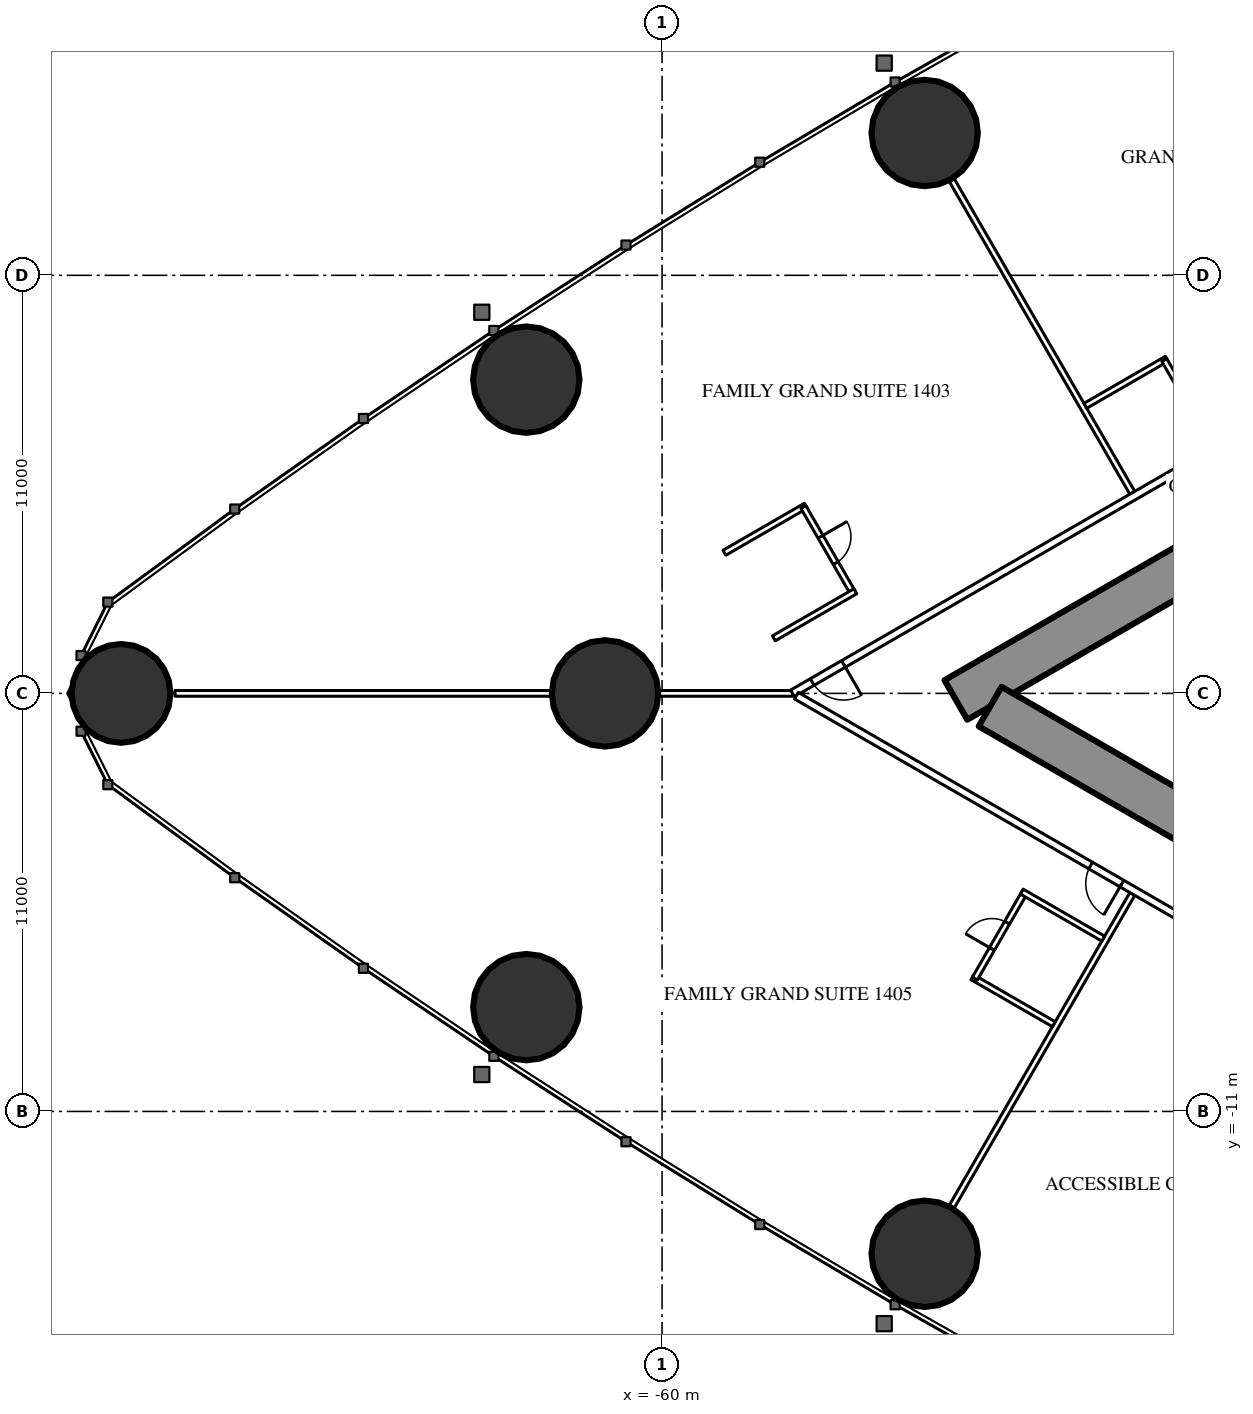
"""IFC4 building model, lengths in metres.
Left out: names, types, materials, properties, quantities, classifications, styles, units other than length and angle.
Written with IfcOpenShell. Run it as: python <this file> out.ifc"""

import sys

from ifc_helpers import new_model, si_unit, direction, frame, frame_2d, origin, origin_2d, place, context, subcontext, project, spatial, rectangle, hollow_circle, extrude, element, fill, save


model = new_model("IFC4")
c1 = context("Model", 3, precision=1e-05, world=origin(), true_north=direction((0.0, 1.0)))
c2 = subcontext(c1, "Body", "Model", "MODEL_VIEW")
j1 = project(units=[si_unit("LENGTHUNIT", "METRE"), si_unit("PLANEANGLEUNIT", "RADIAN")], contexts=[c1])
p1 = place(None, origin())
s1 = spatial("IfcSite", under=j1, at=p1, CompositionType="ELEMENT")
p2 = place(p1, origin())
s2 = spatial("IfcBuilding", under=s1, at=p2, CompositionType="ELEMENT")
p3 = place(p2, frame((0.0, 0.0, 56.5)))
s3 = spatial("IfcBuildingStorey", under=s2, at=p3, CompositionType="ELEMENT", Elevation=56.5)
p4 = place(p3, frame((-74.235, 0.0, 0.0), z_axis=(0.0, 0.0, 1.0), x_axis=(1.0, 0.0, 0.0)))
e1 = element("IfcColumn", 1, at=p4, inside=s3, PredefinedType="COLUMN", context=c2, shape_type="SweptSolid", body=[
    extrude(hollow_circle(Radius=1.3, WallThickness=0.1, at=origin_2d()), origin(), (0.0, 0.0, 1.0), 3.5),
])
for number, where, z_axis, x_axis in (
    (2, (-63.572, -8.255, 0.0), (0.0, 0.0, 1.0), (1.0, 0.0, 0.0)),
    (3, (-53.09, -14.745, 0.0), (0.0, 0.0, 1.0), (1.0, 0.0, 0.0)),
    (4, (-53.09, 14.745, 0.0), (0.0, 0.0, 1.0), (1.0, 0.0, 0.0)),
    (5, (-63.572, 8.255, 0.0), (0.0, 0.0, 1.0), (1.0, 0.0, 0.0)),
):
    element("IfcColumn", number, at=place(p3, frame(where, z_axis=z_axis, x_axis=x_axis)), inside=s3, PredefinedType="COLUMN", context=c2, shape_type="SweptSolid", body=[
        extrude(hollow_circle(Radius=1.4, WallThickness=0.12, at=origin_2d()), origin(), (0.0, 0.0, 1.0), 3.5),
    ])
p5 = place(p3, frame((-61.5, 0.0, 0.0), z_axis=(0.0, 0.0, 1.0), x_axis=(1.0, 0.0, 0.0)))
e6 = element("IfcColumn", 6, at=p5, inside=s3, PredefinedType="COLUMN", context=c2, shape_type="SweptSolid", body=[
    extrude(hollow_circle(Radius=1.4, WallThickness=0.1, at=origin_2d()), origin(), (0.0, 0.0, 1.0), 3.5),
])
p6 = place(p3, frame((-27.2, 14.3, 0.0), z_axis=(0.0, 0.0, 1.0), x_axis=(-0.866026593062, -0.499997940104, 0.0)))
e7 = element("IfcWall", 7, at=p6, inside=s3, PredefinedType="SHEAR", context=c2, shape_type="SweptSolid", body=[
    extrude(rectangle(XDim=28.946, YDim=1.2, at=frame_2d((14.473, 0.0))), origin(), (0.0, 0.0, 1.0), 3.5),
])
p7 = place(p6, frame((4.6, 0.0, 0.0)))
e8 = element("IfcOpeningElement", 8, at=p7, cuts=e7, PredefinedType="OPENING", context=c2, shape_type="SweptSolid", body=[
    extrude(rectangle(XDim=1.0, YDim=2.2, at=frame_2d((0.5, 1.1))), frame((0.0, 0.61, 0.0), z_axis=(0.0, -1.0, 0.0), x_axis=(1.0, 0.0, 0.0)), (0.0, 0.0, 1.0), 1.22),
])
p8 = place(p6, frame((13.395, 0.0, 0.0)))
e9 = element("IfcOpeningElement", 9, at=p8, cuts=e7, PredefinedType="OPENING", context=c2, shape_type="SweptSolid", body=[
    extrude(rectangle(XDim=1.8, YDim=2.2, at=frame_2d((0.9, 1.1))), frame((0.0, 0.61, 0.0), z_axis=(0.0, -1.0, 0.0), x_axis=(1.0, 0.0, 0.0)), (0.0, 0.0, 1.0), 1.22),
])
p9 = place(p3, frame((-27.2, -14.3, 0.0), z_axis=(0.0, 0.0, 1.0), x_axis=(-0.866024021859, 0.500002393557, 0.0)))
e10 = element("IfcWall", 10, at=p9, inside=s3, PredefinedType="SHEAR", context=c2, shape_type="SweptSolid", body=[
    extrude(rectangle(XDim=27.907, YDim=1.2, at=frame_2d((13.954, 0.0))), origin(), (0.0, 0.0, 1.0), 3.5),
])
p10 = place(p9, frame((4.6, 0.0, 0.0)))
e11 = element("IfcOpeningElement", 11, at=p10, cuts=e10, PredefinedType="OPENING", context=c2, shape_type="SweptSolid", body=[
    extrude(rectangle(XDim=1.0, YDim=2.2, at=frame_2d((0.5, 1.1))), frame((0.0, 0.61, 0.0), z_axis=(0.0, -1.0, 0.0), x_axis=(1.0, 0.0, 0.0)), (0.0, 0.0, 1.0), 1.22),
])
p11 = place(p9, frame((13.395, 0.0, 0.0)))
e12 = element("IfcOpeningElement", 12, at=p11, cuts=e10, PredefinedType="OPENING", context=c2, shape_type="SweptSolid", body=[
    extrude(rectangle(XDim=1.8, YDim=2.2, at=frame_2d((0.9, 1.1))), frame((0.0, 0.61, 0.0), z_axis=(0.0, -1.0, 0.0), x_axis=(1.0, 0.0, 0.0)), (0.0, 0.0, 1.0), 1.22),
])
for number, where, z_axis, x_axis in (
    (13, (-47.627, 5.278, 0.0), (0.0, 0.0, 1.0), (-0.5, 0.866, 0.0)),
    (14, (-47.627, -5.278, 0.0), (0.0, 0.0, 1.0), (-0.5, -0.866, 0.0)),
):
    element("IfcWall", number, at=place(p3, frame(where, z_axis=z_axis, x_axis=x_axis)), inside=s3, PredefinedType="PARTITIONING", context=c2, shape_type="SweptSolid", body=[
        extrude(rectangle(XDim=9.51, YDim=0.15, at=frame_2d((4.755, 0.0))), origin(), (0.0, 0.0, 1.0), 2.25),
    ])
p12 = place(p3, frame((-56.568, 0.0, 0.0), z_axis=(0.0, 0.0, 1.0), x_axis=(-1.0, 0.0, 0.0)))
e15 = element("IfcWall", 15, at=p12, inside=s3, PredefinedType="PARTITIONING", context=c2, shape_type="SweptSolid", body=[
    extrude(rectangle(XDim=16.247, YDim=0.15, at=frame_2d((8.124, 0.0))), origin(), (0.0, 0.0, 1.0), 2.25),
])
p13 = place(p3, frame((-37.7, 10.894, 0.0), z_axis=(0.0, 0.0, 1.0), x_axis=(-0.866027905338, -0.499995667157, 0.0)))
e16 = element("IfcWall", 16, at=p13, inside=s3, PredefinedType="PARTITIONING", context=c2, shape_type="SweptSolid", body=[
    extrude(rectangle(XDim=21.787, YDim=0.2, at=frame_2d((10.894, 0.0))), origin(), (0.0, 0.0, 1.0), 3.25),
])
p14 = place(p13, frame((20.237, 0.0, 0.0)))
e17 = element("IfcOpeningElement", 17, at=p14, cuts=e16, PredefinedType="OPENING", context=c2, shape_type="SweptSolid", body=[
    extrude(rectangle(XDim=0.95, YDim=2.2, at=frame_2d((0.475, 1.1))), frame((0.0, 0.11, 0.0), z_axis=(0.0, -1.0, 0.0), x_axis=(1.0, 0.0, 0.0)), (0.0, 0.0, 1.0), 0.22),
])
p15 = place(p13, frame((7.73, 0.0, 0.0)))
e18 = element("IfcOpeningElement", 18, at=p15, cuts=e16, PredefinedType="OPENING", context=c2, shape_type="SweptSolid", body=[
    extrude(rectangle(XDim=0.95, YDim=2.2, at=frame_2d((0.475, 1.1))), frame((0.0, 0.11, 0.0), z_axis=(0.0, -1.0, 0.0), x_axis=(1.0, 0.0, 0.0)), (0.0, 0.0, 1.0), 0.22),
])
p16 = place(p3, frame((-36.92, -11.344, 0.0), z_axis=(0.0, 0.0, 1.0), x_axis=(-0.866028313256, 0.499994960614, 0.0)))
e19 = element("IfcWall", 19, at=p16, inside=s3, PredefinedType="PARTITIONING", context=c2, shape_type="SweptSolid", body=[
    extrude(rectangle(XDim=22.568, YDim=0.2, at=frame_2d((11.284, 0.0))), origin(), (0.0, 0.0, 1.0), 3.25),
])
p17 = place(p16, frame((12.68, 0.0, 0.0)))
e20 = element("IfcOpeningElement", 20, at=p17, cuts=e19, PredefinedType="OPENING", context=c2, shape_type="SweptSolid", body=[
    extrude(rectangle(XDim=0.95, YDim=2.2, at=frame_2d((0.475, 1.1))), frame((0.0, 0.11, 0.0), z_axis=(0.0, -1.0, 0.0), x_axis=(1.0, 0.0, 0.0)), (0.0, 0.0, 1.0), 0.22),
])
p18 = place(p16, frame((3.35, 0.0, 0.0)))
e21 = element("IfcOpeningElement", 21, at=p18, cuts=e19, PredefinedType="OPENING", context=c2, shape_type="SweptSolid", body=[
    extrude(rectangle(XDim=1.0, YDim=2.2, at=frame_2d((0.5, 1.1))), frame((0.0, 0.11, 0.0), z_axis=(0.0, -1.0, 0.0), x_axis=(1.0, 0.0, 0.0)), (0.0, 0.0, 1.0), 0.22),
])
p19 = place(p3, frame((-56.215, 4.938, 0.0), z_axis=(0.0, 0.0, 1.0), x_axis=(-0.866006523861, -0.500032699561, 0.0)))
e22 = element("IfcWall", 22, at=p19, inside=s3, PredefinedType="PARTITIONING", context=c2, shape_type="SweptSolid", body=[
    extrude(rectangle(XDim=2.475, YDim=0.15, at=frame_2d((1.237, 0.0))), origin(), (0.0, 0.0, 1.0), 3.25),
])
p20 = place(p3, frame((-54.98, 2.649, 0.0), z_axis=(0.0, 0.0, 1.0), x_axis=(-0.500006934395, 0.866021400173, 0.0)))
e23 = element("IfcWall", 23, at=p20, inside=s3, PredefinedType="PARTITIONING", context=c2, shape_type="SweptSolid", body=[
    extrude(rectangle(XDim=2.6, YDim=0.15, at=frame_2d((1.3, 0.0))), origin(), (0.0, 0.0, 1.0), 3.25),
])
p21 = place(p20, frame((0.9, 0.0, 0.0)))
e24 = element("IfcOpeningElement", 24, at=p21, cuts=e23, PredefinedType="OPENING", context=c2, shape_type="SweptSolid", body=[
    extrude(rectangle(XDim=0.8, YDim=2.2, at=frame_2d((0.4, 1.1))), frame((0.0, 0.085, 0.0), z_axis=(0.0, -1.0, 0.0), x_axis=(1.0, 0.0, 0.0)), (0.0, 0.0, 1.0), 0.17),
])
p22 = place(p3, frame((-54.915, 2.687, 0.0), z_axis=(0.0, 0.0, 1.0), x_axis=(-0.866006523861, -0.500032699561, 0.0)))
e25 = element("IfcWall", 25, at=p22, inside=s3, PredefinedType="PARTITIONING", context=c2, shape_type="SweptSolid", body=[
    extrude(rectangle(XDim=2.475, YDim=0.15, at=frame_2d((1.237, 0.0))), origin(), (0.0, 0.0, 1.0), 3.25),
])
p23 = place(p3, frame((-49.692, -8.704, 0.0), z_axis=(0.0, 0.0, 1.0), x_axis=(-0.866073894602, 0.499916002032, 0.0)))
e26 = element("IfcWall", 26, at=p23, inside=s3, PredefinedType="PARTITIONING", context=c2, shape_type="SweptSolid", body=[
    extrude(rectangle(XDim=2.475, YDim=0.15, at=frame_2d((1.238, 0.0))), origin(), (0.0, 0.0, 1.0), 3.25),
])
p24 = place(p3, frame((-50.47, -5.253, 0.0), z_axis=(0.0, 0.0, 1.0), x_axis=(-0.500006934395, -0.866021400173, 0.0)))
e27 = element("IfcWall", 27, at=p24, inside=s3, PredefinedType="PARTITIONING", context=c2, shape_type="SweptSolid", body=[
    extrude(rectangle(XDim=2.6, YDim=0.15, at=frame_2d((1.3, 0.0))), origin(), (0.0, 0.0, 1.0), 3.25),
])
p25 = place(p24, frame((0.9, 0.0, 0.0)))
e28 = element("IfcOpeningElement", 28, at=p25, cuts=e27, PredefinedType="OPENING", context=c2, shape_type="SweptSolid", body=[
    extrude(rectangle(XDim=0.8, YDim=2.2, at=frame_2d((0.4, 1.1))), frame((0.0, 0.085, 0.0), z_axis=(0.0, -1.0, 0.0), x_axis=(1.0, 0.0, 0.0)), (0.0, 0.0, 1.0), 0.17),
])
for number, where, z_axis, x_axis in (
    (29, (-48.392, -6.453, 0.0), (0.0, 0.0, 1.0), (-0.866, 0.5, 0.0)),
    (30, (-46.719, 8.804, 0.0), (0.0, 0.0, 1.0), (-0.866, -0.5, 0.0)),
):
    element("IfcWall", number, at=place(p3, frame(where, z_axis=z_axis, x_axis=x_axis)), inside=s3, PredefinedType="PARTITIONING", context=c2, shape_type="SweptSolid", body=[
        extrude(rectangle(XDim=2.475, YDim=0.15, at=frame_2d((1.237, 0.0))), origin(), (0.0, 0.0, 1.0), 3.25),
    ])
p26 = place(p3, frame((-45.483, 6.515, 0.0), z_axis=(0.0, 0.0, 1.0), x_axis=(-0.500006934395, 0.866021400173, 0.0)))
e31 = element("IfcWall", 31, at=p26, inside=s3, PredefinedType="PARTITIONING", context=c2, shape_type="SweptSolid", body=[
    extrude(rectangle(XDim=2.6, YDim=0.15, at=frame_2d((1.3, 0.0))), origin(), (0.0, 0.0, 1.0), 3.25),
])
p27 = place(p26, frame((0.9, 0.0, 0.0)))
e32 = element("IfcOpeningElement", 32, at=p27, cuts=e31, PredefinedType="OPENING", context=c2, shape_type="SweptSolid", body=[
    extrude(rectangle(XDim=0.8, YDim=2.2, at=frame_2d((0.4, 1.1))), frame((0.0, 0.085, 0.0), z_axis=(0.0, -1.0, 0.0), x_axis=(1.0, 0.0, 0.0)), (0.0, 0.0, 1.0), 0.17),
])
p28 = place(p21, origin())
e33 = element("IfcDoor", 33, at=p28, inside=s3, OperationType="SINGLE_SWING_RIGHT", PredefinedType="DOOR", context=c2, shape_type="SweptSolid", body=[
    extrude(rectangle(XDim=0.8, YDim=2.2, at=frame_2d((0.4, 1.1))), frame((0.0, 0.025, 0.0), z_axis=(0.0, -1.0, 0.0), x_axis=(1.0, 0.0, 0.0)), (0.0, 0.0, 1.0), 0.05),
])
fill(e24, e33)
p29 = place(p14, origin())
e34 = element("IfcDoor", 34, at=p29, inside=s3, OperationType="SINGLE_SWING_LEFT", PredefinedType="DOOR", context=c2, shape_type="SweptSolid", body=[
    extrude(rectangle(XDim=0.95, YDim=2.2, at=frame_2d((0.475, 1.1))), frame((0.0, 0.025, 0.0), z_axis=(0.0, -1.0, 0.0), x_axis=(1.0, 0.0, 0.0)), (0.0, 0.0, 1.0), 0.05),
])
fill(e17, e34)
p30 = place(p25, origin())
e35 = element("IfcDoor", 35, at=p30, inside=s3, OperationType="SINGLE_SWING_RIGHT", PredefinedType="DOOR", context=c2, shape_type="SweptSolid", body=[
    extrude(rectangle(XDim=0.8, YDim=2.2, at=frame_2d((0.4, 1.1))), frame((0.0, 0.025, 0.0), z_axis=(0.0, -1.0, 0.0), x_axis=(1.0, 0.0, 0.0)), (0.0, 0.0, 1.0), 0.05),
])
fill(e28, e35)
p31 = place(p17, origin())
e36 = element("IfcDoor", 36, at=p31, inside=s3, OperationType="SINGLE_SWING_LEFT", PredefinedType="DOOR", context=c2, shape_type="SweptSolid", body=[
    extrude(rectangle(XDim=0.95, YDim=2.2, at=frame_2d((0.475, 1.1))), frame((0.0, 0.025, 0.0), z_axis=(0.0, -1.0, 0.0), x_axis=(1.0, 0.0, 0.0)), (0.0, 0.0, 1.0), 0.05),
])
fill(e20, e36)
save(model, sys.argv[1])
